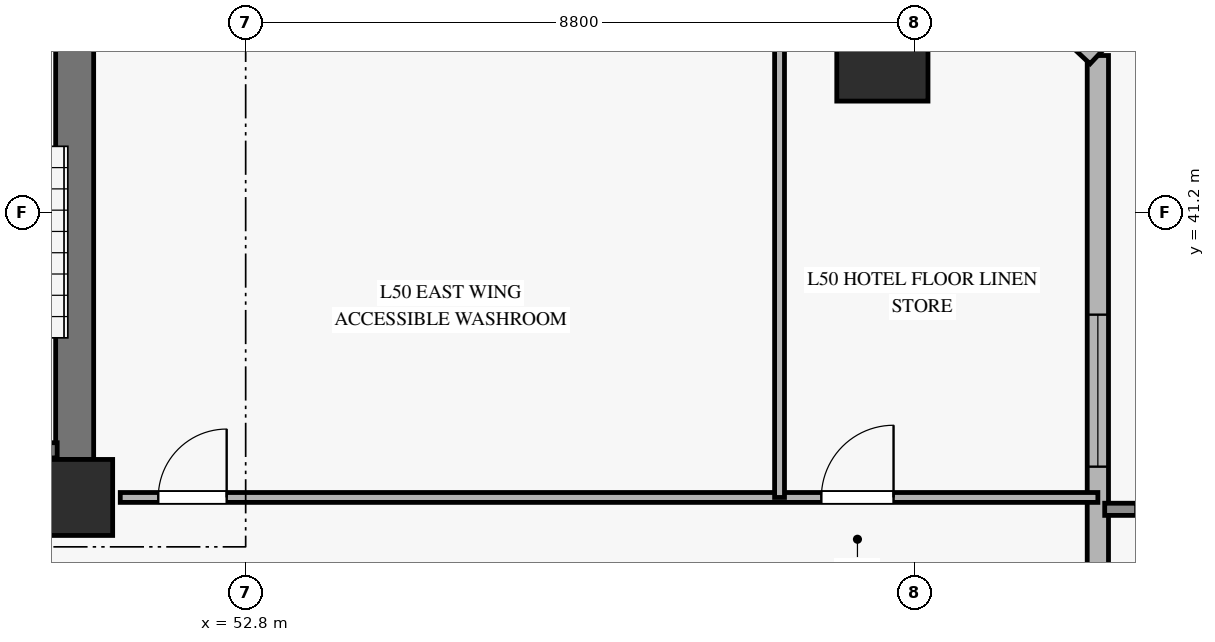
"""IFC4 building model, lengths in metres.
Left out: names, types, materials, properties, quantities, classifications, styles, units other than length and angle.
Written with IfcOpenShell. Run it as: python <this file> out.ifc"""

import sys

from ifc_helpers import new_model, si_unit, direction, frame, frame_2d, origin, origin_2d, place, context, subcontext, project, spatial, rectangle, hollow_rectangle, extrude, source, transform, mapped, element, fill, save


model = new_model("IFC4")
c1 = context("Model", 3, precision=1e-05, world=origin(), true_north=direction((0.0, 1.0)))
c2 = subcontext(c1, "Body", "Model", "MODEL_VIEW")
j1 = project(units=[si_unit("LENGTHUNIT", "METRE"), si_unit("PLANEANGLEUNIT", "RADIAN")], contexts=[c1])
p1 = place(None, origin())
s1 = spatial("IfcSite", under=j1, at=p1, CompositionType="ELEMENT")
p2 = place(p1, origin())
s2 = spatial("IfcBuilding", under=s1, at=p2, CompositionType="ELEMENT")
p3 = place(p2, frame((0.0, 0.0, 199.2)))
s3 = spatial("IfcBuildingStorey", under=s2, at=p3, CompositionType="ELEMENT", Elevation=199.2)
m1 = source(origin(), c2, "Body", "SweptSolid", [
    extrude(rectangle(XDim=1.0, YDim=1.0, at=origin_2d()), origin(), (0.0, 0.0, 1.0), 3.27),
])
p4 = place(p3, frame((50.55, 37.45, 0.0), z_axis=(0.0, 0.0, 1.0), x_axis=(1.0, 0.0, 0.0)))
e1 = element("IfcColumn", 1, at=p4, inside=s3, PredefinedType="PILASTER", context=c2, shape_type="MappedRepresentation", body=[
    mapped(m1, transform((0.0, 0.0, 0.0), x_axis=(1.0, 0.0, 0.0), y_axis=(0.0, 1.0, 0.0), z_axis=(0.0, 0.0, 1.0), scale=1.0)),
])
p5 = place(p3, frame((50.55, 37.95, 0.0), z_axis=(0.0, 0.0, 1.0), x_axis=(0.0, 1.0, 0.0)))
e2 = element("IfcWall", 2, at=p5, inside=s3, PredefinedType="SHEAR", context=c2, shape_type="SweptSolid", body=[
    extrude(rectangle(XDim=8.1, YDim=0.5, at=frame_2d((4.05, 0.0))), origin(), (0.0, 0.0, 1.0), 3.27),
])
m2 = source(origin(), c2, "Body", "SweptSolid", [
    extrude(hollow_rectangle(XDim=1.2, YDim=1.2, WallThickness=0.055, at=origin_2d()), origin(), (0.0, 0.0, 1.0), 3.282),
])
p6 = place(p3, frame((61.177, 43.265, 0.0), z_axis=(-0.085022800609, 0.010711533935, 0.99632142726), x_axis=(-0.124996185477, -0.992157222226, 0.0)))
e3 = element("IfcColumn", 3, at=p6, inside=s3, PredefinedType="COLUMN", context=c2, shape_type="MappedRepresentation", body=[
    mapped(m2, transform((0.0, 0.0, 0.0), x_axis=(1.0, 0.0, 0.0), y_axis=(0.0, 1.0, 0.0), z_axis=(0.0, 0.0, 1.0), scale=1.0)),
])
p7 = place(p3, frame((64.012, 28.74, 0.0), z_axis=(0.0, 0.0, 1.0), x_axis=(0.0, 1.0, 0.0)))
e4 = element("IfcWall", 4, at=p7, inside=s3, PredefinedType="SOLIDWALL", context=c2, shape_type="SweptSolid", body=[
    extrude(rectangle(XDim=14.525, YDim=0.28, at=frame_2d((7.262, 0.0))), origin(), (0.0, 0.0, 1.0), 2.75),
])
p8 = place(p7, frame((9.115, 0.0, 0.45)))
e5 = element("IfcOpeningElement", 5, at=p8, cuts=e4, PredefinedType="OPENING", context=c2, shape_type="SweptSolid", body=[
    extrude(rectangle(XDim=2.0, YDim=2.0, at=frame_2d((1.0, 1.0))), frame((0.0, 0.15, 0.0), z_axis=(0.0, -1.0, 0.0), x_axis=(1.0, 0.0, 0.0)), (0.0, 0.0, 1.0), 0.3),
])
p9 = place(p3, frame((64.012, 43.265, 0.0), z_axis=(0.0, 0.0, 1.0), x_axis=(-0.729638355144, 0.683833218484, 0.0)))
e6 = element("IfcWall", 6, at=p9, inside=s3, PredefinedType="SOLIDWALL", context=c2, shape_type="SweptSolid", body=[
    extrude(rectangle(XDim=4.365, YDim=0.3, at=frame_2d((2.183, 0.0))), origin(), (0.0, 0.0, 1.0), 2.75),
])
p10 = place(p9, frame((1.383, 0.0, 0.45)))
e7 = element("IfcOpeningElement", 7, at=p10, cuts=e6, PredefinedType="OPENING", context=c2, shape_type="SweptSolid", body=[
    extrude(rectangle(XDim=1.6, YDim=2.0, at=frame_2d((0.8, 1.0))), frame((0.0, 0.16, 0.0), z_axis=(0.0, -1.0, 0.0), x_axis=(1.0, 0.0, 0.0)), (0.0, 0.0, 1.0), 0.32),
])
p11 = place(p3, frame((47.44, 38.07, 0.0), z_axis=(0.0, 0.0, 1.0), x_axis=(1.0, 0.0, 0.0)))
e8 = element("IfcWall", 8, at=p11, inside=s3, PredefinedType="SOLIDWALL", context=c2, shape_type="SweptSolid", body=[
    extrude(rectangle(XDim=2.88, YDim=0.2, at=frame_2d((1.44, 0.0))), origin(), (0.0, 0.0, 1.0), 3.5),
])
p12 = place(p3, frame((51.15, 37.45, 0.0), z_axis=(0.0, 0.0, 1.0), x_axis=(1.0, 0.0, 0.0)))
e9 = element("IfcWall", 9, at=p12, inside=s3, PredefinedType="PARTITIONING", context=c2, shape_type="SweptSolid", body=[
    extrude(rectangle(XDim=12.862, YDim=0.13, at=frame_2d((6.431, 0.0))), origin(), (0.0, 0.0, 1.0), 2.755),
])
p13 = place(p12, frame((0.5, 0.0, 0.0)))
e10 = element("IfcOpeningElement", 10, at=p13, cuts=e9, PredefinedType="OPENING", context=c2, shape_type="SweptSolid", body=[
    extrude(rectangle(XDim=0.9, YDim=2.1, at=frame_2d((0.45, 1.05))), frame((0.0, 0.075, 0.0), z_axis=(0.0, -1.0, 0.0), x_axis=(1.0, 0.0, 0.0)), (0.0, 0.0, 1.0), 0.15),
])
p14 = place(p12, frame((9.224, 0.0, 0.0)))
e11 = element("IfcOpeningElement", 11, at=p14, cuts=e9, PredefinedType="OPENING", context=c2, shape_type="SweptSolid", body=[
    extrude(rectangle(XDim=0.95, YDim=2.1, at=frame_2d((0.475, 1.05))), frame((0.0, 0.075, 0.0), z_axis=(0.0, -1.0, 0.0), x_axis=(1.0, 0.0, 0.0)), (0.0, 0.0, 1.0), 0.15),
])
p15 = place(p3, frame((59.824, 37.45, 0.0), z_axis=(0.0, 0.0, 1.0), x_axis=(0.0, 1.0, 0.0)))
e12 = element("IfcWall", 12, at=p15, inside=s3, PredefinedType="PARTITIONING", context=c2, shape_type="SweptSolid", body=[
    extrude(rectangle(XDim=8.8, YDim=0.13, at=frame_2d((4.4, 0.0))), origin(), (0.0, 0.0, 1.0), 2.755),
])
m3 = source(origin(), c2, "Body", "SweptSolid", [
    extrude(rectangle(XDim=2.0, YDim=2.0, at=frame_2d((1.0, 1.0))), frame((0.0, 0.03, 0.0), z_axis=(0.0, -1.0, 0.0), x_axis=(1.0, 0.0, 0.0)), (0.0, 0.0, 1.0), 0.06),
])
p16 = place(p8, origin())
e13 = element("IfcWindow", 13, at=p16, inside=s3, PartitioningType="SINGLE_PANEL", PredefinedType="WINDOW", context=c2, shape_type="MappedRepresentation", body=[
    mapped(m3, transform((0.0, 0.0, 0.0), x_axis=(1.0, 0.0, 0.0), y_axis=(0.0, 1.0, 0.0), z_axis=(0.0, 0.0, 1.0), scale=1.0)),
])
fill(e5, e13)
m4 = source(origin(), c2, "Body", "SweptSolid", [
    extrude(rectangle(XDim=0.9, YDim=2.1, at=frame_2d((0.45, 1.05))), frame((0.0, 0.025, 0.0), z_axis=(0.0, -1.0, 0.0), x_axis=(1.0, 0.0, 0.0)), (0.0, 0.0, 1.0), 0.05),
])
p17 = place(p13, origin())
e14 = element("IfcDoor", 14, at=p17, inside=s3, OperationType="SINGLE_SWING_RIGHT", PredefinedType="DOOR", context=c2, shape_type="MappedRepresentation", body=[
    mapped(m4, transform((0.0, 0.0, 0.0), x_axis=(1.0, 0.0, 0.0), y_axis=(0.0, 1.0, 0.0), z_axis=(0.0, 0.0, 1.0), scale=1.0)),
])
fill(e10, e14)
m5 = source(origin(), c2, "Body", "SweptSolid", [
    extrude(rectangle(XDim=0.95, YDim=2.1, at=frame_2d((0.475, 1.05))), frame((0.0, 0.025, 0.0), z_axis=(0.0, -1.0, 0.0), x_axis=(1.0, 0.0, 0.0)), (0.0, 0.0, 1.0), 0.05),
])
p18 = place(p14, origin())
e15 = element("IfcDoor", 15, at=p18, inside=s3, OperationType="SINGLE_SWING_RIGHT", PredefinedType="DOOR", context=c2, shape_type="MappedRepresentation", body=[
    mapped(m5, transform((0.0, 0.0, 0.0), x_axis=(1.0, 0.0, 0.0), y_axis=(0.0, 1.0, 0.0), z_axis=(0.0, 0.0, 1.0), scale=1.0)),
])
fill(e11, e15)
save(model, sys.argv[1])
